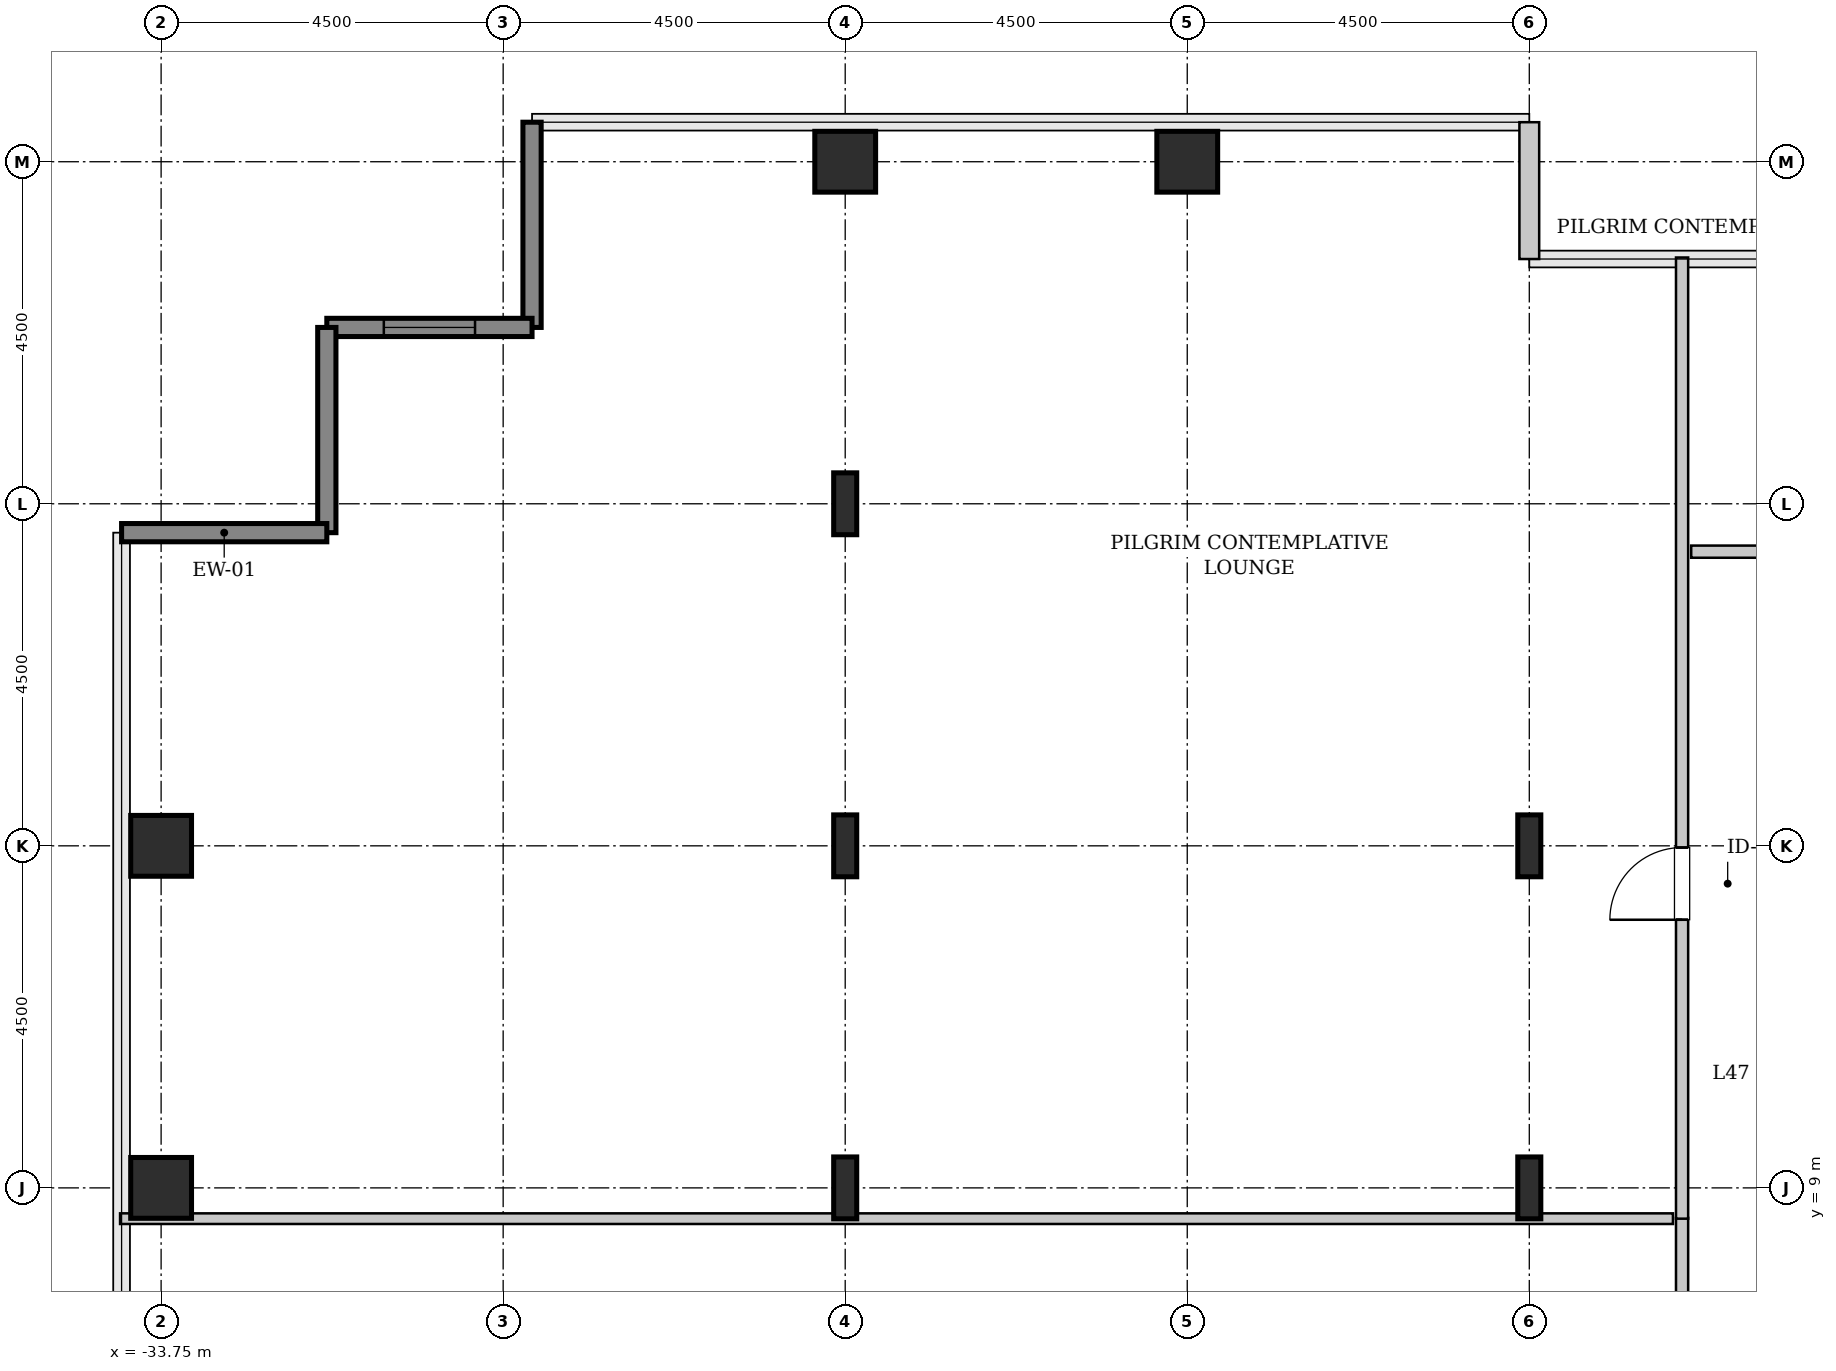
"""IFC4 building model, lengths in metres.
Left out: names, types, materials, properties, quantities, classifications, styles, units other than length and angle.
Written with IfcOpenShell. Run it as: python <this file> out.ifc"""

import sys

from ifc_helpers import new_model, si_unit, direction, frame, frame_2d, origin, origin_2d, place, context, subcontext, project, spatial, rectangle, hollow_rectangle, i_section, extrude, source, transform, mapped, element, fill, save


model = new_model("IFC4")
c1 = context("Model", 3, precision=1e-05, world=origin(), true_north=direction((0.0, 1.0)))
c2 = subcontext(c1, "Body", "Model", "MODEL_VIEW")
j1 = project(units=[si_unit("LENGTHUNIT", "METRE"), si_unit("PLANEANGLEUNIT", "RADIAN")], contexts=[c1])
p1 = place(None, origin())
s1 = spatial("IfcSite", under=j1, at=p1, CompositionType="ELEMENT")
p2 = place(p1, origin())
s2 = spatial("IfcBuilding", under=s1, at=p2, CompositionType="ELEMENT")
p3 = place(p2, frame((0.0, 0.0, 190.6)))
s3 = spatial("IfcBuildingStorey", under=s2, at=p3, CompositionType="ELEMENT", Elevation=190.6)
m1 = source(origin(), c2, "Body", "SweptSolid", [
    extrude(hollow_rectangle(XDim=0.8, YDim=0.8, WallThickness=0.04, InnerFilletRadius=0.04, OuterFilletRadius=0.08, at=origin_2d()), origin(), (0.0, 0.0, 1.0), 3.8),
])
for number, where, z_axis, x_axis in (
    (1, (-33.75, 9.0, 0.0), (0.0, 0.0, 1.0), (1.0, 0.0, 0.0)),
    (2, (-33.75, 13.5, 0.0), (0.0, 0.0, 1.0), (1.0, 0.0, 0.0)),
):
    element("IfcColumn", number, at=place(p3, frame(where, z_axis=z_axis, x_axis=x_axis)), inside=s3, PredefinedType="COLUMN", context=c2, shape_type="MappedRepresentation", body=[
        mapped(m1, transform((0.0, 0.0, 0.0), x_axis=(1.0, 0.0, 0.0), y_axis=(0.0, 1.0, 0.0), z_axis=(0.0, 0.0, 1.0), scale=1.0)),
    ])
m2 = source(origin(), c2, "Body", "SweptSolid", [
    extrude(i_section(OverallWidth=0.303, OverallDepth=0.814, WebThickness=0.021, FlangeThickness=0.04, FilletRadius=0.03, at=origin_2d()), origin(), (0.0, 0.0, 1.0), 3.8),
])
for number, where, z_axis, x_axis in (
    (3, (-24.75, 9.0, 0.0), (0.0, 0.0, 1.0), (1.0, 0.0, 0.0)),
    (4, (-24.75, 13.5, 0.0), (0.0, 0.0, 1.0), (1.0, 0.0, 0.0)),
    (5, (-24.75, 18.0, 0.0), (0.0, 0.0, 1.0), (1.0, 0.0, 0.0)),
):
    element("IfcColumn", number, at=place(p3, frame(where, z_axis=z_axis, x_axis=x_axis)), inside=s3, PredefinedType="COLUMN", context=c2, shape_type="MappedRepresentation", body=[
        mapped(m2, transform((0.0, 0.0, 0.0), x_axis=(1.0, 0.0, 0.0), y_axis=(0.0, 1.0, 0.0), z_axis=(0.0, 0.0, 1.0), scale=1.0)),
    ])
for number, where, z_axis, x_axis in (
    (6, (-24.75, 22.5, 0.0), (0.0, 0.0, 1.0), (1.0, 0.0, 0.0)),
    (7, (-20.25, 22.5, 0.0), (0.0, 0.0, 1.0), (1.0, 0.0, 0.0)),
):
    element("IfcColumn", number, at=place(p3, frame(where, z_axis=z_axis, x_axis=x_axis)), inside=s3, PredefinedType="COLUMN", context=c2, shape_type="MappedRepresentation", body=[
        mapped(m1, transform((0.0, 0.0, 0.0), x_axis=(1.0, 0.0, 0.0), y_axis=(0.0, 1.0, 0.0), z_axis=(0.0, 0.0, 1.0), scale=1.0)),
    ])
for number, where, z_axis, x_axis in (
    (8, (-15.75, 9.0, 0.0), (0.0, 0.0, 1.0), (1.0, 0.0, 0.0)),
    (9, (-15.75, 13.5, 0.0), (0.0, 0.0, 1.0), (1.0, 0.0, 0.0)),
):
    element("IfcColumn", number, at=place(p3, frame(where, z_axis=z_axis, x_axis=x_axis)), inside=s3, PredefinedType="COLUMN", context=c2, shape_type="MappedRepresentation", body=[
        mapped(m2, transform((0.0, 0.0, 0.0), x_axis=(1.0, 0.0, 0.0), y_axis=(0.0, 1.0, 0.0), z_axis=(0.0, 0.0, 1.0), scale=1.0)),
    ])
m3 = source(origin(), c2, "Body", "SweptSolid", [
    extrude(rectangle(XDim=1.8, YDim=0.26, at=frame_2d((0.9, 0.0))), origin(), (0.0, 0.0, 1.0), 3.55),
])
p4 = place(p3, frame((-15.75, 21.22, 0.0), z_axis=(0.0, 0.0, 1.0), x_axis=(0.0, 1.0, 0.0)))
e10 = element("IfcWall", 10, at=p4, inside=s3, PredefinedType="SOLIDWALL", context=c2, shape_type="MappedRepresentation", body=[
    mapped(m3, transform((0.0, 0.0, 0.0), x_axis=(1.0, 0.0, 0.0), y_axis=(0.0, 1.0, 0.0), z_axis=(0.0, 0.0, 1.0), scale=1.0)),
])
m4 = source(origin(), c2, "Body", "SweptSolid", [
    extrude(rectangle(XDim=2.7, YDim=0.24, at=frame_2d((1.35, 0.0))), origin(), (0.0, 0.0, 1.0), 3.55),
])
p5 = place(p3, frame((-28.87, 23.02, 0.0), z_axis=(0.0, 0.0, 1.0), x_axis=(0.0, -1.0, 0.0)))
e11 = element("IfcWall", 11, at=p5, inside=s3, PredefinedType="SHEAR", context=c2, shape_type="MappedRepresentation", body=[
    mapped(m4, transform((0.0, 0.0, 0.0), x_axis=(1.0, 0.0, 0.0), y_axis=(0.0, 1.0, 0.0), z_axis=(0.0, 0.0, 1.0), scale=1.0)),
])
p6 = place(p3, frame((-28.87, 20.32, 0.0), z_axis=(0.0, 0.0, 1.0), x_axis=(-1.0, 0.0, 0.0)))
e12 = element("IfcWall", 12, at=p6, inside=s3, PredefinedType="SHEAR", context=c2, shape_type="MappedRepresentation", body=[
    mapped(m4, transform((0.0, 0.0, 0.0), x_axis=(1.0, 0.0, 0.0), y_axis=(0.0, 1.0, 0.0), z_axis=(0.0, 0.0, 1.0), scale=1.0)),
])
p7 = place(p6, frame((0.75, 0.0, 0.85)))
e13 = element("IfcOpeningElement", 13, at=p7, cuts=e12, PredefinedType="OPENING", context=c2, shape_type="SweptSolid", body=[
    extrude(rectangle(XDim=1.2, YDim=1.8, at=frame_2d((0.6, 0.9))), frame((0.0, 0.13, 0.0), z_axis=(0.0, -1.0, 0.0), x_axis=(1.0, 0.0, 0.0)), (0.0, 0.0, 1.0), 0.26),
])
for number, where, z_axis, x_axis in (
    (14, (-31.57, 20.32, 0.0), (0.0, 0.0, 1.0), (0.0, -1.0, 0.0)),
    (15, (-31.57, 17.62, 0.0), (0.0, 0.0, 1.0), (-1.0, 0.0, 0.0)),
):
    element("IfcWall", number, at=place(p3, frame(where, z_axis=z_axis, x_axis=x_axis)), inside=s3, PredefinedType="SHEAR", context=c2, shape_type="MappedRepresentation", body=[
        mapped(m4, transform((0.0, 0.0, 0.0), x_axis=(1.0, 0.0, 0.0), y_axis=(0.0, 1.0, 0.0), z_axis=(0.0, 0.0, 1.0), scale=1.0)),
    ])
m5 = source(origin(), c2, "Body", "SweptSolid", [
    extrude(rectangle(XDim=3.21, YDim=0.16, at=frame_2d((1.605, 0.0))), origin(), (0.0, 0.0, 1.0), 3.535),
])
p8 = place(p3, frame((-13.74, 5.395, 0.0), z_axis=(0.0, 0.0, 1.0), x_axis=(0.0, 1.0, 0.0)))
e16 = element("IfcWall", 16, at=p8, inside=s3, PredefinedType="PARTITIONING", context=c2, shape_type="MappedRepresentation", body=[
    mapped(m5, transform((0.0, 0.0, 0.0), x_axis=(1.0, 0.0, 0.0), y_axis=(0.0, 1.0, 0.0), z_axis=(0.0, 0.0, 1.0), scale=1.0)),
])
p9 = place(p8, frame((1.13, 0.0, 0.0)))
e17 = element("IfcOpeningElement", 17, at=p9, cuts=e16, PredefinedType="OPENING", context=c2, shape_type="SweptSolid", body=[
    extrude(rectangle(XDim=0.95, YDim=2.1, at=frame_2d((0.475, 1.05))), frame((0.0, 0.09, 0.0), z_axis=(0.0, -1.0, 0.0), x_axis=(1.0, 0.0, 0.0)), (0.0, 0.0, 1.0), 0.18),
])
m6 = source(origin(), c2, "Body", "SweptSolid", [
    extrude(rectangle(XDim=20.43, YDim=0.14, at=frame_2d((10.215, 0.0))), origin(), (0.0, 0.0, 1.0), 2.875),
])
p10 = place(p3, frame((-34.29, 8.595, 0.0), z_axis=(0.0, 0.0, 1.0), x_axis=(1.0, 0.0, 0.0)))
e18 = element("IfcWall", 18, at=p10, inside=s3, PredefinedType="PARTITIONING", context=c2, shape_type="MappedRepresentation", body=[
    mapped(m6, transform((0.0, 0.0, 0.0), x_axis=(1.0, 0.0, 0.0), y_axis=(0.0, 1.0, 0.0), z_axis=(0.0, 0.0, 1.0), scale=1.0)),
])
m7 = source(origin(), c2, "Body", "SweptSolid", [
    extrude(rectangle(XDim=12.645, YDim=0.16, at=frame_2d((6.323, 0.0))), origin(), (0.0, 0.0, 1.0), 3.535),
])
p11 = place(p3, frame((-13.74, 8.595, 0.0), z_axis=(0.0, 0.0, 1.0), x_axis=(0.0, 1.0, 0.0)))
e19 = element("IfcWall", 19, at=p11, inside=s3, PredefinedType="PARTITIONING", context=c2, shape_type="MappedRepresentation", body=[
    mapped(m7, transform((0.0, 0.0, 0.0), x_axis=(1.0, 0.0, 0.0), y_axis=(0.0, 1.0, 0.0), z_axis=(0.0, 0.0, 1.0), scale=1.0)),
])
p12 = place(p11, frame((3.933, 0.0, 0.0)))
e20 = element("IfcOpeningElement", 20, at=p12, cuts=e19, PredefinedType="OPENING", context=c2, shape_type="SweptSolid", body=[
    extrude(rectangle(XDim=0.95, YDim=2.1, at=frame_2d((0.475, 1.05))), frame((0.0, 0.09, 0.0), z_axis=(0.0, -1.0, 0.0), x_axis=(1.0, 0.0, 0.0)), (0.0, 0.0, 1.0), 0.18),
])
m8 = source(origin(), c2, "Body", "SweptSolid", [
    extrude(rectangle(XDim=4.16, YDim=0.16, at=frame_2d((2.08, 0.0))), origin(), (0.0, 0.0, 1.0), 3.535),
])
p13 = place(p3, frame((-13.62, 17.37, 0.0), z_axis=(0.0, 0.0, 1.0), x_axis=(1.0, 0.0, 0.0)))
e21 = element("IfcWall", 21, at=p13, inside=s3, PredefinedType="PARTITIONING", context=c2, shape_type="MappedRepresentation", body=[
    mapped(m8, transform((0.0, 0.0, 0.0), x_axis=(1.0, 0.0, 0.0), y_axis=(0.0, 1.0, 0.0), z_axis=(0.0, 0.0, 1.0), scale=1.0)),
])
p14 = place(p13, frame((0.969, 0.0, 0.0)))
e22 = element("IfcOpeningElement", 22, at=p14, cuts=e21, PredefinedType="OPENING", context=c2, shape_type="SweptSolid", body=[
    extrude(rectangle(XDim=0.95, YDim=2.1, at=frame_2d((0.475, 1.05))), frame((0.0, 0.09, 0.0), z_axis=(0.0, -1.0, 0.0), x_axis=(1.0, 0.0, 0.0)), (0.0, 0.0, 1.0), 0.18),
])
m9 = source(origin(), c2, "Body", "SweptSolid", [
    extrude(rectangle(XDim=1.2, YDim=1.8, at=frame_2d((0.6, 0.9))), frame((0.0, 0.03, 0.0), z_axis=(0.0, -1.0, 0.0), x_axis=(1.0, 0.0, 0.0)), (0.0, 0.0, 1.0), 0.06),
])
p15 = place(p7, origin())
e23 = element("IfcWindow", 23, at=p15, inside=s3, PartitioningType="SINGLE_PANEL", PredefinedType="WINDOW", context=c2, shape_type="MappedRepresentation", body=[
    mapped(m9, transform((0.0, 0.0, 0.0), x_axis=(1.0, 0.0, 0.0), y_axis=(0.0, 1.0, 0.0), z_axis=(0.0, 0.0, 1.0), scale=1.0)),
])
fill(e13, e23)
m10 = source(origin(), c2, "Body", "SweptSolid", [
    extrude(rectangle(XDim=0.95, YDim=2.1, at=frame_2d((0.475, 1.05))), frame((0.0, 0.025, 0.0), z_axis=(0.0, -1.0, 0.0), x_axis=(1.0, 0.0, 0.0)), (0.0, 0.0, 1.0), 0.05),
])
p16 = place(p12, origin())
e24 = element("IfcDoor", 24, at=p16, inside=s3, OperationType="SINGLE_SWING_LEFT", PredefinedType="DOOR", context=c2, shape_type="MappedRepresentation", body=[
    mapped(m10, transform((0.0, 0.0, 0.0), x_axis=(1.0, 0.0, 0.0), y_axis=(0.0, 1.0, 0.0), z_axis=(0.0, 0.0, 1.0), scale=1.0)),
])
fill(e20, e24)
save(model, sys.argv[1])
